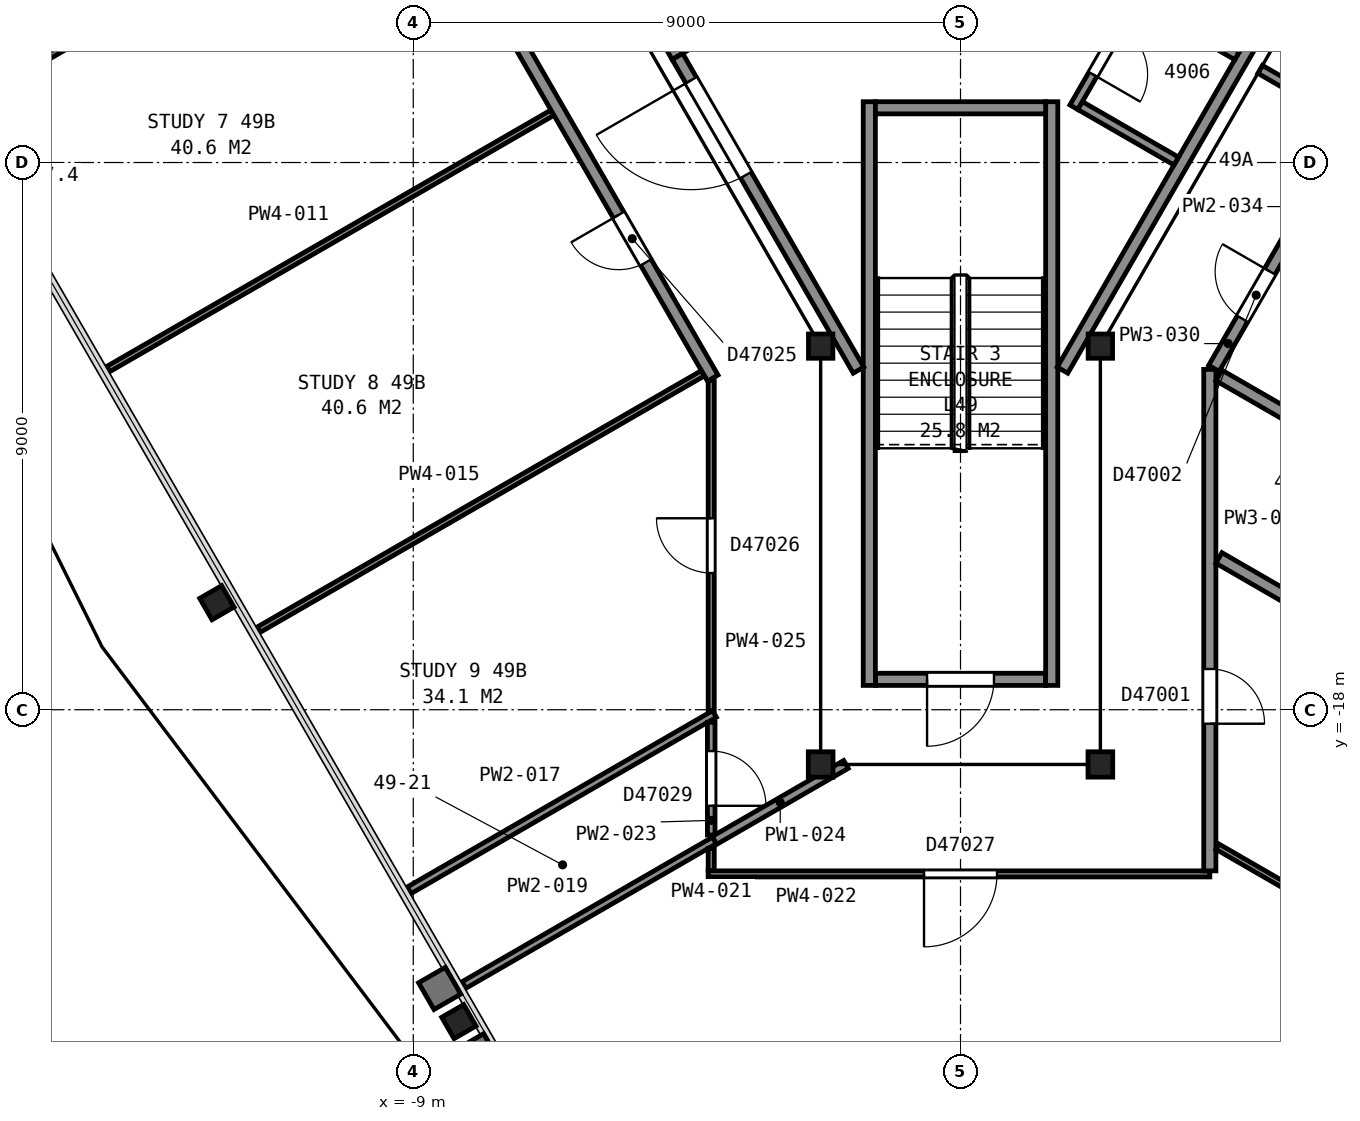
"""IFC4 building model, lengths in metres.
Left out: names, types, materials, properties, quantities, classifications, styles, units other than length and angle.
Written with IfcOpenShell. Run it as: python <this file> out.ifc"""

import sys

from ifc_helpers import new_model, si_unit, direction, frame, frame_2d, origin, origin_2d, place, context, subcontext, project, spatial, rectangle, i_section, extrude, element, fill, save


model = new_model("IFC4")
c1 = context("Model", 3, precision=1e-05, world=origin(), true_north=direction((0.0, 1.0)))
c2 = subcontext(c1, "Body", "Model", "MODEL_VIEW")
j1 = project(units=[si_unit("LENGTHUNIT", "METRE"), si_unit("PLANEANGLEUNIT", "RADIAN")], contexts=[c1])
p1 = place(None, origin())
s1 = spatial("IfcSite", under=j1, at=p1, CompositionType="ELEMENT")
p2 = place(p1, origin())
s2 = spatial("IfcBuilding", under=s1, at=p2, CompositionType="ELEMENT")
p3 = place(p2, frame((0.0, 0.0, 196.9)))
s3 = spatial("IfcBuildingStorey", under=s2, at=p3, CompositionType="ELEMENT", Elevation=196.9)
for number, where, z_axis, x_axis in (
    (1, (-12.23, -16.24, 0.0), (0.0, 0.0, 1.0), (-0.5, 0.866, 0.0)),
    (2, (-8.25, -23.13, 0.0), (0.0, 0.0, 1.0), (-0.5, 0.866, 0.0)),
):
    element("IfcColumn", number, at=place(p3, frame(where, z_axis=z_axis, x_axis=x_axis)), inside=s3, PredefinedType="COLUMN", context=c2, shape_type="SweptSolid", body=[
        extrude(i_section(OverallWidth=0.406, OverallDepth=0.417, WebThickness=0.03, FlangeThickness=0.048, FilletRadius=0.015, at=origin_2d()), origin(), (0.0, 0.0, 1.0), 3.01),
    ])
p4 = place(p3, frame((-2.3, -12.02, 0.0), z_axis=(0.0, 0.0, 1.0), x_axis=(1.0, 0.0, 0.0)))
e3 = element("IfcColumn", 3, at=p4, inside=s3, PredefinedType="COLUMN", context=c2, shape_type="SweptSolid", body=[
    extrude(i_section(OverallWidth=0.401, OverallDepth=0.399, WebThickness=0.025, FlangeThickness=0.04, FilletRadius=0.015, at=origin_2d()), origin(), (0.0, 0.0, 1.0), 3.7),
])
for number, where, z_axis, x_axis in (
    (4, (-2.3, -18.9, 0.0), (0.0, 0.0, 1.0), (-1.0, 0.0, 0.0)),
    (5, (2.3, -18.9, 0.0), (0.0, 0.0, 1.0), (-1.0, 0.0, 0.0)),
):
    element("IfcColumn", number, at=place(p3, frame(where, z_axis=z_axis, x_axis=x_axis)), inside=s3, PredefinedType="COLUMN", context=c2, shape_type="SweptSolid", body=[
        extrude(i_section(OverallWidth=0.406, OverallDepth=0.417, WebThickness=0.03, FlangeThickness=0.048, FilletRadius=0.015, at=origin_2d()), origin(), (0.0, 0.0, 1.0), 3.7),
    ])
p5 = place(p3, frame((2.3, -12.02, 0.0), z_axis=(0.0, 0.0, 1.0), x_axis=(1.0, 0.0, 0.0)))
e6 = element("IfcColumn", 6, at=p5, inside=s3, PredefinedType="COLUMN", context=c2, shape_type="SweptSolid", body=[
    extrude(i_section(OverallWidth=0.401, OverallDepth=0.399, WebThickness=0.025, FlangeThickness=0.04, FilletRadius=0.015, at=origin_2d()), origin(), (0.0, 0.0, 1.0), 3.7),
])
p6 = place(p3, frame((-1.4, -17.5, 0.0), z_axis=(0.0, 0.0, 1.0), x_axis=(1.0, 0.0, 0.0)))
e7 = element("IfcWall", 7, at=p6, inside=s3, PredefinedType="PARTITIONING", context=c2, shape_type="SweptSolid", body=[
    extrude(rectangle(XDim=2.8, YDim=0.2, at=frame_2d((1.4, 0.0))), origin(), (0.0, 0.0, 1.0), 3.45),
])
p7 = place(p6, frame((0.85, 0.0, 0.0)))
e8 = element("IfcOpeningElement", 8, at=p7, cuts=e7, PredefinedType="OPENING", context=c2, shape_type="SweptSolid", body=[
    extrude(rectangle(XDim=1.1, YDim=2.1, at=frame_2d((0.55, 1.05))), frame((0.0, 0.11, 0.0), z_axis=(0.0, -1.0, 0.0), x_axis=(1.0, 0.0, 0.0)), (0.0, 0.0, 1.0), 0.22),
])
for number, where, z_axis, x_axis in (
    (9, (1.5, -8.0, 0.0), (0.0, 0.0, 1.0), (0.0, -1.0, 0.0)),
    (10, (-1.5, -8.0, 0.0), (0.0, 0.0, 1.0), (0.0, -1.0, 0.0)),
):
    element("IfcWall", number, at=place(p3, frame(where, z_axis=z_axis, x_axis=x_axis)), inside=s3, PredefinedType="PARTITIONING", context=c2, shape_type="SweptSolid", body=[
        extrude(rectangle(XDim=9.6, YDim=0.2, at=frame_2d((4.8, 0.0))), origin(), (0.0, 0.0, 1.0), 3.45),
    ])
p8 = place(p3, frame((-1.4, -8.1, 0.0), z_axis=(0.0, 0.0, 1.0), x_axis=(1.0, 0.0, 0.0)))
e11 = element("IfcWall", 11, at=p8, inside=s3, PredefinedType="PARTITIONING", context=c2, shape_type="SweptSolid", body=[
    extrude(rectangle(XDim=2.8, YDim=0.2, at=frame_2d((1.4, 0.0))), origin(), (0.0, 0.0, 1.0), 3.45),
])
p9 = place(p3, frame((-4.62, -7.118, 0.0), z_axis=(0.0, 0.0, 1.0), x_axis=(0.866036909293, 0.499980071345, 0.0)))
e12 = element("IfcWall", 12, at=p9, inside=s3, PredefinedType="PARTITIONING", context=c2, shape_type="SweptSolid", body=[
    extrude(rectangle(XDim=1.75, YDim=0.2, at=frame_2d((0.875, 0.0))), origin(), (0.0, 0.0, 1.0), 3.7),
])
p10 = place(p3, frame((-4.656, -7.255, 0.0), z_axis=(0.0, 0.0, 1.0), x_axis=(-0.499990435942, 0.866030925526, 0.0)))
e13 = element("IfcWall", 13, at=p10, inside=s3, PredefinedType="PARTITIONING", context=c2, shape_type="SweptSolid", body=[
    extrude(rectangle(XDim=2.55, YDim=0.2, at=frame_2d((1.275, 0.0))), origin(), (0.0, 0.0, 1.0), 3.7),
])
p11 = place(p3, frame((-4.655, -7.257, 0.0), z_axis=(0.0, 0.0, 1.0), x_axis=(0.499966124405, -0.866044960985, 0.0)))
e14 = element("IfcWall", 14, at=p11, inside=s3, PredefinedType="PARTITIONING", context=c2, shape_type="SweptSolid", body=[
    extrude(rectangle(XDim=5.956, YDim=0.2, at=frame_2d((2.978, 0.0))), origin(), (0.0, 0.0, 1.0), 3.45),
])
p12 = place(p11, frame((0.45, 0.0, 0.0)))
e15 = element("IfcOpeningElement", 15, at=p12, cuts=e14, PredefinedType="OPENING", context=c2, shape_type="SweptSolid", body=[
    extrude(rectangle(XDim=1.8, YDim=2.1, at=frame_2d((0.9, 1.05))), frame((0.0, 0.11, 0.0), z_axis=(0.0, -1.0, 0.0), x_axis=(1.0, 0.0, 0.0)), (0.0, 0.0, 1.0), 0.22),
])
p13 = place(p3, frame((1.677, -12.415, 0.0), z_axis=(0.0, 0.0, 1.0), x_axis=(0.500054337157, 0.865994029939, 0.0)))
e16 = element("IfcWall", 16, at=p13, inside=s3, PredefinedType="PARTITIONING", context=c2, shape_type="SweptSolid", body=[
    extrude(rectangle(XDim=6.177, YDim=0.2, at=frame_2d((3.088, 0.0))), origin(), (0.0, 0.0, 1.0), 3.45),
])
p14 = place(p3, frame((2.939, -6.229, 0.0), z_axis=(0.0, 0.0, 1.0), x_axis=(-0.499961633463, -0.866047553582, 0.0)))
e17 = element("IfcWall", 17, at=p14, inside=s3, PredefinedType="PARTITIONING", context=c2, shape_type="SweptSolid", body=[
    extrude(rectangle(XDim=2.15, YDim=0.15, at=frame_2d((1.075, 0.0))), origin(), (0.0, 0.0, 1.0), 3.45),
])
p15 = place(p14, frame((0.625, 0.0, 0.0)))
e18 = element("IfcOpeningElement", 18, at=p15, cuts=e17, PredefinedType="OPENING", context=c2, shape_type="SweptSolid", body=[
    extrude(rectangle(XDim=0.9, YDim=2.1, at=frame_2d((0.45, 1.05))), frame((0.0, 0.085, 0.0), z_axis=(0.0, -1.0, 0.0), x_axis=(1.0, 0.0, 0.0)), (0.0, 0.0, 1.0), 0.17),
])
p16 = place(p3, frame((1.967, -8.063, 0.0), z_axis=(0.0, 0.0, 1.0), x_axis=(0.865978377894, -0.500081442387, 0.0)))
e19 = element("IfcWall", 19, at=p16, inside=s3, PredefinedType="PARTITIONING", context=c2, shape_type="SweptSolid", body=[
    extrude(rectangle(XDim=1.825, YDim=0.15, at=frame_2d((0.913, 0.0))), origin(), (0.0, 0.0, 1.0), 3.45),
])
p17 = place(p3, frame((2.967, -6.332, 0.0), z_axis=(0.0, 0.0, 1.0), x_axis=(0.866036312054, -0.499981105847, 0.0)))
e20 = element("IfcWall", 20, at=p17, inside=s3, PredefinedType="PARTITIONING", context=c2, shape_type="SweptSolid", body=[
    extrude(rectangle(XDim=1.825, YDim=0.15, at=frame_2d((0.912, 0.0))), origin(), (0.0, 0.0, 1.0), 3.45),
])
p18 = place(p3, frame((-16.489, -8.11, 0.0), z_axis=(0.0, 0.0, 1.0), x_axis=(0.865995531057, 0.500051737513, 0.0)))
e21 = element("IfcWall", 21, at=p18, inside=s3, PredefinedType="PARTITIONING", context=c2, shape_type="SweptSolid", body=[
    extrude(rectangle(XDim=8.429, YDim=0.1, at=frame_2d((4.214, 0.0))), origin(), (0.0, 0.0, 1.0), 2.362),
])
p19 = place(p3, frame((-14.015, -12.396, 0.0), z_axis=(0.0, 0.0, 1.0), x_axis=(0.866079962101, 0.499905490315, 0.0)))
e22 = element("IfcWall", 22, at=p19, inside=s3, PredefinedType="PARTITIONING", context=c2, shape_type="SweptSolid", body=[
    extrude(rectangle(XDim=8.429, YDim=0.1, at=frame_2d((4.214, 0.0))), origin(), (0.0, 0.0, 1.0), 2.362),
])
p20 = place(p3, frame((-4.075, -12.545, 0.0), z_axis=(0.0, 0.0, 1.0), x_axis=(-0.499999743747, 0.866025551732, 0.0)))
e23 = element("IfcWall", 23, at=p20, inside=s3, PredefinedType="PARTITIONING", context=c2, shape_type="SweptSolid", body=[
    extrude(rectangle(XDim=17.656, YDim=0.2, at=frame_2d((8.828, 0.0))), origin(), (0.0, 0.0, 1.0), 2.362),
])
p21 = place(p20, frame((10.83, 0.0, 0.0)))
e24 = element("IfcOpeningElement", 24, at=p21, cuts=e23, PredefinedType="OPENING", context=c2, shape_type="SweptSolid", body=[
    extrude(rectangle(XDim=0.9, YDim=2.1, at=frame_2d((0.45, 1.05))), frame((0.0, 0.11, 0.0), z_axis=(0.0, -1.0, 0.0), x_axis=(1.0, 0.0, 0.0)), (0.0, 0.0, 1.0), 0.22),
])
p22 = place(p20, frame((7.148, 0.0, 0.0)))
e25 = element("IfcOpeningElement", 25, at=p22, cuts=e23, PredefinedType="OPENING", context=c2, shape_type="SweptSolid", body=[
    extrude(rectangle(XDim=0.9, YDim=2.1, at=frame_2d((0.45, 1.05))), frame((0.0, 0.11, 0.0), z_axis=(0.0, -1.0, 0.0), x_axis=(1.0, 0.0, 0.0)), (0.0, 0.0, 1.0), 0.22),
])
p23 = place(p20, frame((2.198, 0.0, 0.0)))
e26 = element("IfcOpeningElement", 26, at=p23, cuts=e23, PredefinedType="OPENING", context=c2, shape_type="SweptSolid", body=[
    extrude(rectangle(XDim=0.9, YDim=2.1, at=frame_2d((0.45, 1.05))), frame((0.0, 0.11, 0.0), z_axis=(0.0, -1.0, 0.0), x_axis=(1.0, 0.0, 0.0)), (0.0, 0.0, 1.0), 0.22),
])
p24 = place(p3, frame((-11.54, -16.682, 0.0), z_axis=(0.0, 0.0, 1.0), x_axis=(0.866063141794, 0.499934630153, 0.0)))
e27 = element("IfcWall", 27, at=p24, inside=s3, PredefinedType="PARTITIONING", context=c2, shape_type="SweptSolid", body=[
    extrude(rectangle(XDim=8.433, YDim=0.1, at=frame_2d((4.217, 0.0))), origin(), (0.0, 0.0, 1.0), 2.362),
])
p25 = place(p3, frame((-9.066, -20.968, 0.0), z_axis=(0.0, 0.0, 1.0), x_axis=(0.866023559602, 0.500003194204, 0.0)))
e28 = element("IfcWall", 28, at=p25, inside=s3, PredefinedType="PARTITIONING", context=c2, shape_type="SweptSolid", body=[
    extrude(rectangle(XDim=5.796, YDim=0.125, at=frame_2d((2.898, 0.0))), origin(), (0.0, 0.0, 1.0), 2.362),
])
p26 = place(p3, frame((-8.166, -22.527, 0.0), z_axis=(0.0, 0.0, 1.0), x_axis=(0.866042865666, 0.499969753915, 0.0)))
e29 = element("IfcWall", 29, at=p26, inside=s3, PredefinedType="PARTITIONING", context=c2, shape_type="SweptSolid", body=[
    extrude(rectangle(XDim=4.757, YDim=0.125, at=frame_2d((2.378, 0.0))), origin(), (0.0, 0.0, 1.0), 2.362),
])
p27 = place(p3, frame((-4.1, -20.65, 0.0), z_axis=(0.0, 0.0, 1.0), x_axis=(0.0, 1.0, 0.0)))
e30 = element("IfcWall", 30, at=p27, inside=s3, PredefinedType="PARTITIONING", context=c2, shape_type="SweptSolid", body=[
    extrude(rectangle(XDim=0.37, YDim=0.1, at=frame_2d((0.185, 0.0))), origin(), (0.0, 0.0, 1.0), 2.362),
])
p28 = place(p3, frame((4.1, -20.7, 0.0), z_axis=(0.0, 0.0, 1.0), x_axis=(-1.0, 0.0, 0.0)))
e31 = element("IfcWall", 31, at=p28, inside=s3, PredefinedType="PARTITIONING", context=c2, shape_type="SweptSolid", body=[
    extrude(rectangle(XDim=8.25, YDim=0.1, at=frame_2d((4.125, 0.0))), origin(), (0.0, 0.0, 1.0), 2.362),
])
p29 = place(p28, frame((3.5, 0.0, 0.0)))
e32 = element("IfcOpeningElement", 32, at=p29, cuts=e31, PredefinedType="OPENING", context=c2, shape_type="SweptSolid", body=[
    extrude(rectangle(XDim=1.2, YDim=2.1, at=frame_2d((0.6, 1.05))), frame((0.0, 0.06, 0.0), z_axis=(0.0, -1.0, 0.0), x_axis=(1.0, 0.0, 0.0)), (0.0, 0.0, 1.0), 0.12),
])
p30 = place(p3, frame((-4.1, -18.206, 0.0), z_axis=(0.0, 0.0, 1.0), x_axis=(0.0, -1.0, 0.0)))
e33 = element("IfcWall", 33, at=p30, inside=s3, PredefinedType="PARTITIONING", context=c2, shape_type="SweptSolid", body=[
    extrude(rectangle(XDim=1.854, YDim=0.125, at=frame_2d((0.927, 0.0))), origin(), (0.0, 0.0, 1.0), 2.362),
])
p31 = place(p30, frame((0.474, 0.0, 0.0)))
e34 = element("IfcOpeningElement", 34, at=p31, cuts=e33, PredefinedType="OPENING", context=c2, shape_type="SweptSolid", body=[
    extrude(rectangle(XDim=0.9, YDim=2.1, at=frame_2d((0.45, 1.05))), frame((0.0, 0.073, 0.0), z_axis=(0.0, -1.0, 0.0), x_axis=(1.0, 0.0, 0.0)), (0.0, 0.0, 1.0), 0.145),
])
p32 = place(p3, frame((-4.046, -20.149, 0.0), z_axis=(0.0, 0.0, 1.0), x_axis=(0.865916841101, 0.500187988959, 0.0)))
e35 = element("IfcWall", 35, at=p32, inside=s3, PredefinedType="PARTITIONING", context=c2, shape_type="SweptSolid", body=[
    extrude(rectangle(XDim=2.497, YDim=0.15, at=frame_2d((1.248, 0.0))), origin(), (0.0, 0.0, 1.0), 2.362),
])
p33 = place(p3, frame((-4.1, -18.016, 0.0), z_axis=(0.0, 0.0, 1.0), x_axis=(0.0, 1.0, 0.0)))
e36 = element("IfcWall", 36, at=p33, inside=s3, PredefinedType="PARTITIONING", context=c2, shape_type="SweptSolid", body=[
    extrude(rectangle(XDim=5.429, YDim=0.1, at=frame_2d((2.715, 0.0))), origin(), (0.0, 0.0, 1.0), 2.362),
])
p34 = place(p33, frame((2.265, 0.0, 0.0)))
e37 = element("IfcOpeningElement", 37, at=p34, cuts=e36, PredefinedType="OPENING", context=c2, shape_type="SweptSolid", body=[
    extrude(rectangle(XDim=0.9, YDim=2.1, at=frame_2d((0.45, 1.05))), frame((0.0, 0.06, 0.0), z_axis=(0.0, -1.0, 0.0), x_axis=(1.0, 0.0, 0.0)), (0.0, 0.0, 1.0), 0.12),
])
p35 = place(p3, frame((4.1, -12.402, 0.0), z_axis=(0.0, 0.0, 1.0), x_axis=(0.0, -1.0, 0.0)))
e38 = element("IfcWall", 38, at=p35, inside=s3, PredefinedType="PARTITIONING", context=c2, shape_type="SweptSolid", body=[
    extrude(rectangle(XDim=8.248, YDim=0.2, at=frame_2d((4.124, 0.0))), origin(), (0.0, 0.0, 1.0), 2.362),
])
p36 = place(p35, frame((4.928, 0.0, 0.0)))
e39 = element("IfcOpeningElement", 39, at=p36, cuts=e38, PredefinedType="OPENING", context=c2, shape_type="SweptSolid", body=[
    extrude(rectangle(XDim=0.9, YDim=2.1, at=frame_2d((0.45, 1.05))), frame((0.0, 0.11, 0.0), z_axis=(0.0, -1.0, 0.0), x_axis=(1.0, 0.0, 0.0)), (0.0, 0.0, 1.0), 0.22),
])
p37 = place(p3, frame((4.225, -20.252, 0.0), z_axis=(0.0, 0.0, 1.0), x_axis=(0.866048884701, -0.499959327653, 0.0)))
e40 = element("IfcWall", 40, at=p37, inside=s3, PredefinedType="PARTITIONING", context=c2, shape_type="SweptSolid", body=[
    extrude(rectangle(XDim=4.55, YDim=0.1, at=frame_2d((2.275, 0.0))), origin(), (0.0, 0.0, 1.0), 2.362),
])
p38 = place(p3, frame((4.25, -15.504, 0.0), z_axis=(0.0, 0.0, 1.0), x_axis=(0.866025383743, -0.500000034713, 0.0)))
e41 = element("IfcWall", 41, at=p38, inside=s3, PredefinedType="PARTITIONING", context=c2, shape_type="SweptSolid", body=[
    extrude(rectangle(XDim=6.903, YDim=0.2, at=frame_2d((3.451, 0.0))), origin(), (0.0, 0.0, 1.0), 2.362),
])
p39 = place(p3, frame((5.556, -9.98, 0.0), z_axis=(0.0, 0.0, 1.0), x_axis=(-0.499940639567, -0.866059672834, 0.0)))
e42 = element("IfcWall", 42, at=p39, inside=s3, PredefinedType="PARTITIONING", context=c2, shape_type="SweptSolid", body=[
    extrude(rectangle(XDim=2.777, YDim=0.2, at=frame_2d((1.388, 0.0))), origin(), (0.0, 0.0, 1.0), 2.362),
])
p40 = place(p39, frame((0.937, 0.0, 0.0)))
e43 = element("IfcOpeningElement", 43, at=p40, cuts=e42, PredefinedType="OPENING", context=c2, shape_type="SweptSolid", body=[
    extrude(rectangle(XDim=0.9, YDim=2.1, at=frame_2d((0.45, 1.05))), frame((0.0, 0.11, 0.0), z_axis=(0.0, -1.0, 0.0), x_axis=(1.0, 0.0, 0.0)), (0.0, 0.0, 1.0), 0.22),
])
p41 = place(p3, frame((4.25, -12.502, 0.0), z_axis=(0.0, 0.0, 1.0), x_axis=(0.866032087317, -0.499988423603, 0.0)))
e44 = element("IfcWall", 44, at=p41, inside=s3, PredefinedType="PARTITIONING", context=c2, shape_type="SweptSolid", body=[
    extrude(rectangle(XDim=3.39, YDim=0.2, at=frame_2d((1.695, 0.0))), origin(), (0.0, 0.0, 1.0), 2.362),
])
p42 = place(p3, frame((4.928, -7.468, 0.0), z_axis=(0.0, 0.0, 1.0), x_axis=(0.866075426483, -0.499913348133, 0.0)))
e45 = element("IfcWall", 45, at=p42, inside=s3, PredefinedType="PARTITIONING", context=c2, shape_type="SweptSolid", body=[
    extrude(rectangle(XDim=1.698, YDim=0.15, at=frame_2d((0.849, 0.0))), origin(), (0.0, 0.0, 1.0), 2.362),
])
p43 = place(p7, origin())
e46 = element("IfcDoor", 46, at=p43, inside=s3, OperationType="SINGLE_SWING_LEFT", PredefinedType="DOOR", context=c2, shape_type="SweptSolid", body=[
    extrude(rectangle(XDim=1.1, YDim=2.1, at=frame_2d((0.55, 1.05))), frame((0.0, 0.025, 0.0), z_axis=(0.0, -1.0, 0.0), x_axis=(1.0, 0.0, 0.0)), (0.0, 0.0, 1.0), 0.05),
])
fill(e8, e46)
p44 = place(p12, origin())
e47 = element("IfcDoor", 47, at=p44, inside=s3, OperationType="DOUBLE_DOOR_SINGLE_SWING", PredefinedType="DOOR", context=c2, shape_type="SweptSolid", body=[
    extrude(rectangle(XDim=1.8, YDim=2.1, at=frame_2d((0.9, 1.05))), frame((0.0, 0.025, 0.0), z_axis=(0.0, -1.0, 0.0), x_axis=(1.0, 0.0, 0.0)), (0.0, 0.0, 1.0), 0.05),
])
fill(e15, e47)
p45 = place(p15, origin())
e48 = element("IfcDoor", 48, at=p45, inside=s3, OperationType="SINGLE_SWING_RIGHT", PredefinedType="DOOR", context=c2, shape_type="SweptSolid", body=[
    extrude(rectangle(XDim=0.9, YDim=2.1, at=frame_2d((0.45, 1.05))), frame((0.0, 0.025, 0.0), z_axis=(0.0, -1.0, 0.0), x_axis=(1.0, 0.0, 0.0)), (0.0, 0.0, 1.0), 0.05),
])
fill(e18, e48)
p46 = place(p23, origin())
e49 = element("IfcDoor", 49, at=p46, inside=s3, OperationType="SINGLE_SWING_RIGHT", PredefinedType="DOOR", context=c2, shape_type="SweptSolid", body=[
    extrude(rectangle(XDim=0.9, YDim=2.1, at=frame_2d((0.45, 1.05))), frame((0.0, 0.025, 0.0), z_axis=(0.0, -1.0, 0.0), x_axis=(1.0, 0.0, 0.0)), (0.0, 0.0, 1.0), 0.05),
])
fill(e26, e49)
p47 = place(p29, origin())
e50 = element("IfcDoor", 50, at=p47, inside=s3, OperationType="SINGLE_SWING_RIGHT", PredefinedType="DOOR", context=c2, shape_type="SweptSolid", body=[
    extrude(rectangle(XDim=1.2, YDim=2.1, at=frame_2d((0.6, 1.05))), frame((0.0, 0.025, 0.0), z_axis=(0.0, -1.0, 0.0), x_axis=(1.0, 0.0, 0.0)), (0.0, 0.0, 1.0), 0.05),
])
fill(e32, e50)
p48 = place(p31, origin())
e51 = element("IfcDoor", 51, at=p48, inside=s3, OperationType="SINGLE_SWING_RIGHT", PredefinedType="DOOR", context=c2, shape_type="SweptSolid", body=[
    extrude(rectangle(XDim=0.9, YDim=2.1, at=frame_2d((0.45, 1.05))), frame((0.0, 0.025, 0.0), z_axis=(0.0, -1.0, 0.0), x_axis=(1.0, 0.0, 0.0)), (0.0, 0.0, 1.0), 0.05),
])
fill(e34, e51)
p49 = place(p34, origin())
e52 = element("IfcDoor", 52, at=p49, inside=s3, OperationType="SINGLE_SWING_RIGHT", PredefinedType="DOOR", context=c2, shape_type="SweptSolid", body=[
    extrude(rectangle(XDim=0.9, YDim=2.1, at=frame_2d((0.45, 1.05))), frame((0.0, 0.025, 0.0), z_axis=(0.0, -1.0, 0.0), x_axis=(1.0, 0.0, 0.0)), (0.0, 0.0, 1.0), 0.05),
])
fill(e37, e52)
p50 = place(p36, origin())
e53 = element("IfcDoor", 53, at=p50, inside=s3, OperationType="SINGLE_SWING_RIGHT", PredefinedType="DOOR", context=c2, shape_type="SweptSolid", body=[
    extrude(rectangle(XDim=0.9, YDim=2.1, at=frame_2d((0.45, 1.05))), frame((0.0, 0.025, 0.0), z_axis=(0.0, -1.0, 0.0), x_axis=(1.0, 0.0, 0.0)), (0.0, 0.0, 1.0), 0.05),
])
fill(e39, e53)
p51 = place(p40, origin())
e54 = element("IfcDoor", 54, at=p51, inside=s3, OperationType="SINGLE_SWING_LEFT", PredefinedType="DOOR", context=c2, shape_type="SweptSolid", body=[
    extrude(rectangle(XDim=0.9, YDim=2.1, at=frame_2d((0.45, 1.05))), frame((0.0, 0.025, 0.0), z_axis=(0.0, -1.0, 0.0), x_axis=(1.0, 0.0, 0.0)), (0.0, 0.0, 1.0), 0.05),
])
fill(e43, e54)
save(model, sys.argv[1])
